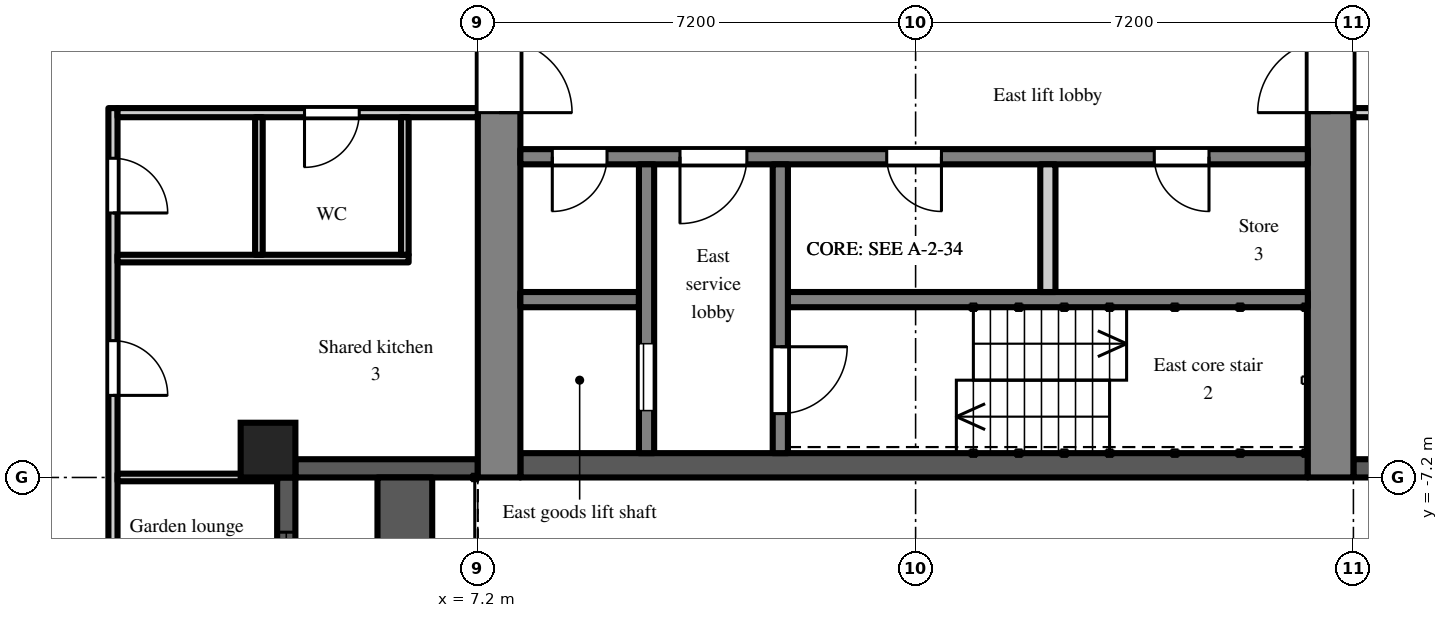
"""IFC4 building model, lengths in metres.
Left out: names, types, materials, properties, quantities, classifications, styles, units other than length and angle.
Written with IfcOpenShell. Run it as: python <this file> out.ifc"""

import sys

from ifc_helpers import new_model, si_unit, direction, frame, frame_2d, origin, origin_2d, place, context, subcontext, project, spatial, rectangle, extrude, element, fill, save


model = new_model("IFC4")
c1 = context("Model", 3, precision=1e-05, world=origin(), true_north=direction((0.0, 1.0)))
c2 = subcontext(c1, "Body", "Model", "MODEL_VIEW")
j1 = project(units=[si_unit("LENGTHUNIT", "METRE"), si_unit("PLANEANGLEUNIT", "RADIAN")], contexts=[c1])
p1 = place(None, origin())
s1 = spatial("IfcSite", under=j1, at=p1, CompositionType="ELEMENT")
p2 = place(p1, origin())
s2 = spatial("IfcBuilding", under=s1, at=p2, CompositionType="ELEMENT")
p3 = place(p2, frame((0.0, 0.0, 201.9)))
s3 = spatial("IfcBuildingStorey", under=s2, at=p3, CompositionType="ELEMENT", Elevation=201.9)
p4 = place(p3, frame((3.75, -6.75, 0.0), z_axis=(0.0, 0.0, 1.0), x_axis=(1.0, 0.0, 0.0)))
e1 = element("IfcColumn", 1, at=p4, inside=s3, PredefinedType="COLUMN", context=c2, shape_type="SweptSolid", body=[
    extrude(rectangle(XDim=0.9, YDim=0.9, at=origin_2d()), origin(), (0.0, 0.0, 1.0), 3.0),
])
p5 = place(p3, frame((21.6, -7.05, 0.0), z_axis=(0.0, 0.0, 1.0), x_axis=(1.0, 0.0, 0.0)))
e2 = element("IfcWall", 2, at=p5, inside=s3, PredefinedType="SOLIDWALL", context=c2, shape_type="SweptSolid", body=[
    extrude(rectangle(XDim=2.7, YDim=0.3, at=frame_2d((1.35, 0.0))), origin(), (0.0, 0.0, 1.0), 2.3),
])
p6 = place(p5, frame((0.75, 0.0, 0.2)))
e3 = element("IfcOpeningElement", 3, at=p6, cuts=e2, PredefinedType="OPENING", context=c2, shape_type="SweptSolid", body=[
    extrude(rectangle(XDim=1.2, YDim=1.85, at=frame_2d((0.6, 0.925))), frame((0.0, 0.16, 0.0), z_axis=(0.0, -1.0, 0.0), x_axis=(1.0, 0.0, 0.0)), (0.0, 0.0, 1.0), 0.32),
])
p7 = place(p3, frame((4.05, -14.4, 0.0), z_axis=(0.0, 0.0, 1.0), x_axis=(0.0, 1.0, 0.0)))
e4 = element("IfcWall", 4, at=p7, inside=s3, PredefinedType="SOLIDWALL", context=c2, shape_type="SweptSolid", body=[
    extrude(rectangle(XDim=7.2, YDim=0.3, at=frame_2d((3.6, 0.0))), origin(), (0.0, 0.0, 1.0), 2.3),
])
p8 = place(p7, frame((3.0, 0.0, 0.0)))
e5 = element("IfcOpeningElement", 5, at=p8, cuts=e4, PredefinedType="OPENING", context=c2, shape_type="SweptSolid", body=[
    extrude(rectangle(XDim=1.2, YDim=2.05, at=frame_2d((0.6, 1.025))), frame((0.0, 0.16, 0.0), z_axis=(0.0, -1.0, 0.0), x_axis=(1.0, 0.0, 0.0)), (0.0, 0.0, 1.0), 0.32),
])
p9 = place(p7, frame((0.9, 0.0, 0.2)))
e6 = element("IfcOpeningElement", 6, at=p9, cuts=e4, PredefinedType="OPENING", context=c2, shape_type="SweptSolid", body=[
    extrude(rectangle(XDim=1.8, YDim=1.85, at=frame_2d((0.9, 0.925))), frame((0.0, 0.16, 0.0), z_axis=(0.0, -1.0, 0.0), x_axis=(1.0, 0.0, 0.0)), (0.0, 0.0, 1.0), 0.32),
])
p10 = place(p7, frame((4.5, 0.0, 0.2)))
e7 = element("IfcOpeningElement", 7, at=p10, cuts=e4, PredefinedType="OPENING", context=c2, shape_type="SweptSolid", body=[
    extrude(rectangle(XDim=1.8, YDim=1.85, at=frame_2d((0.9, 0.925))), frame((0.0, 0.16, 0.0), z_axis=(0.0, -1.0, 0.0), x_axis=(1.0, 0.0, 0.0)), (0.0, 0.0, 1.0), 0.32),
])
p11 = place(p3, frame((4.2, -7.05, 0.0), z_axis=(0.0, 0.0, 1.0), x_axis=(1.0, 0.0, 0.0)))
e8 = element("IfcWall", 8, at=p11, inside=s3, PredefinedType="SOLIDWALL", context=c2, shape_type="SweptSolid", body=[
    extrude(rectangle(XDim=3.0, YDim=0.3, at=frame_2d((1.5, 0.0))), origin(), (0.0, 0.0, 1.0), 2.3),
])
p12 = place(p3, frame((6.0, -14.4, 0.0), z_axis=(0.0, 0.0, 1.0), x_axis=(0.0, 1.0, 0.0)))
e9 = element("IfcWall", 9, at=p12, inside=s3, PredefinedType="PARAPET", context=c2, shape_type="SweptSolid", body=[
    extrude(rectangle(XDim=7.2, YDim=0.9, at=frame_2d((3.6, 0.0))), origin(), (0.0, 0.0, 1.0), 0.8),
])
p13 = place(p3, frame((7.55, -7.2, 0.0), z_axis=(0.0, 0.0, 1.0), x_axis=(0.0, 1.0, 0.0)))
e10 = element("IfcWall", 10, at=p13, inside=s3, PredefinedType="SHEAR", context=c2, shape_type="SweptSolid", body=[
    extrude(rectangle(XDim=14.4, YDim=0.7, at=frame_2d((7.2, 0.0))), origin(), (0.0, 0.0, 1.0), 2.6),
])
p14 = place(p13, frame((6.0, 0.0, 0.0)))
e11 = element("IfcOpeningElement", 11, at=p14, cuts=e10, PredefinedType="OPENING", context=c2, shape_type="SweptSolid", body=[
    extrude(rectangle(XDim=2.4, YDim=2.2, at=frame_2d((1.2, 1.1))), frame((0.0, 0.36, 0.0), z_axis=(0.0, -1.0, 0.0), x_axis=(1.0, 0.0, 0.0)), (0.0, 0.0, 1.0), 0.72),
])
p15 = place(p3, frame((21.225, -7.2, 0.0), z_axis=(0.0, 0.0, 1.0), x_axis=(0.0, 1.0, 0.0)))
e12 = element("IfcWall", 12, at=p15, inside=s3, PredefinedType="SHEAR", context=c2, shape_type="SweptSolid", body=[
    extrude(rectangle(XDim=14.4, YDim=0.75, at=frame_2d((7.2, 0.0))), origin(), (0.0, 0.0, 1.0), 2.6),
])
p16 = place(p15, frame((6.0, 0.0, 0.0)))
e13 = element("IfcOpeningElement", 13, at=p16, cuts=e12, PredefinedType="OPENING", context=c2, shape_type="SweptSolid", body=[
    extrude(rectangle(XDim=2.4, YDim=2.2, at=frame_2d((1.2, 1.1))), frame((0.0, 0.385, 0.0), z_axis=(0.0, -1.0, 0.0), x_axis=(1.0, 0.0, 0.0)), (0.0, 0.0, 1.0), 0.77),
])
p17 = place(p3, frame((7.9, -7.0, 0.0), z_axis=(0.0, 0.0, 1.0), x_axis=(1.0, 0.0, 0.0)))
e14 = element("IfcWall", 14, at=p17, inside=s3, PredefinedType="SHEAR", context=c2, shape_type="SweptSolid", body=[
    extrude(rectangle(XDim=12.95, YDim=0.4, at=frame_2d((6.475, 0.0))), origin(), (0.0, 0.0, 1.0), 2.6),
])
p18 = place(p3, frame((7.9, -1.925, 0.0), z_axis=(0.0, 0.0, 1.0), x_axis=(1.0, 0.0, 0.0)))
e15 = element("IfcWall", 15, at=p18, inside=s3, PredefinedType="SHEAR", context=c2, shape_type="SweptSolid", body=[
    extrude(rectangle(XDim=12.95, YDim=0.25, at=frame_2d((6.475, 0.0))), origin(), (0.0, 0.0, 1.0), 2.6),
])
p19 = place(p18, frame((0.525, 0.0, 0.0)))
e16 = element("IfcOpeningElement", 16, at=p19, cuts=e15, PredefinedType="OPENING", context=c2, shape_type="SweptSolid", body=[
    extrude(rectangle(XDim=0.9, YDim=2.1, at=frame_2d((0.45, 1.05))), frame((0.0, 0.135, 0.0), z_axis=(0.0, -1.0, 0.0), x_axis=(1.0, 0.0, 0.0)), (0.0, 0.0, 1.0), 0.27),
])
p20 = place(p18, frame((2.625, 0.0, 0.0)))
e17 = element("IfcOpeningElement", 17, at=p20, cuts=e15, PredefinedType="OPENING", context=c2, shape_type="SweptSolid", body=[
    extrude(rectangle(XDim=1.1, YDim=2.1, at=frame_2d((0.55, 1.05))), frame((0.0, 0.135, 0.0), z_axis=(0.0, -1.0, 0.0), x_axis=(1.0, 0.0, 0.0)), (0.0, 0.0, 1.0), 0.27),
])
p21 = place(p18, frame((6.025, 0.0, 0.0)))
e18 = element("IfcOpeningElement", 18, at=p21, cuts=e15, PredefinedType="OPENING", context=c2, shape_type="SweptSolid", body=[
    extrude(rectangle(XDim=0.9, YDim=2.1, at=frame_2d((0.45, 1.05))), frame((0.0, 0.135, 0.0), z_axis=(0.0, -1.0, 0.0), x_axis=(1.0, 0.0, 0.0)), (0.0, 0.0, 1.0), 0.27),
])
p22 = place(p18, frame((10.425, 0.0, 0.0)))
e19 = element("IfcOpeningElement", 19, at=p22, cuts=e15, PredefinedType="OPENING", context=c2, shape_type="SweptSolid", body=[
    extrude(rectangle(XDim=0.9, YDim=2.1, at=frame_2d((0.45, 1.05))), frame((0.0, 0.135, 0.0), z_axis=(0.0, -1.0, 0.0), x_axis=(1.0, 0.0, 0.0)), (0.0, 0.0, 1.0), 0.27),
])
p23 = place(p3, frame((7.9, -4.275, 0.0), z_axis=(0.0, 0.0, 1.0), x_axis=(1.0, 0.0, 0.0)))
e20 = element("IfcWall", 20, at=p23, inside=s3, PredefinedType="SHEAR", context=c2, shape_type="SweptSolid", body=[
    extrude(rectangle(XDim=1.95, YDim=0.25, at=frame_2d((0.975, 0.0))), origin(), (0.0, 0.0, 1.0), 2.6),
])
p24 = place(p3, frame((12.3, -4.275, 0.0), z_axis=(0.0, 0.0, 1.0), x_axis=(1.0, 0.0, 0.0)))
e21 = element("IfcWall", 21, at=p24, inside=s3, PredefinedType="SHEAR", context=c2, shape_type="SweptSolid", body=[
    extrude(rectangle(XDim=8.55, YDim=0.25, at=frame_2d((4.275, 0.0))), origin(), (0.0, 0.0, 1.0), 2.6),
])
p25 = place(p3, frame((9.975, -2.05, 0.0), z_axis=(0.0, 0.0, 1.0), x_axis=(0.0, -1.0, 0.0)))
e22 = element("IfcWall", 22, at=p25, inside=s3, PredefinedType="SHEAR", context=c2, shape_type="SweptSolid", body=[
    extrude(rectangle(XDim=4.75, YDim=0.25, at=frame_2d((2.375, 0.0))), origin(), (0.0, 0.0, 1.0), 2.6),
])
p26 = place(p25, frame((2.95, 0.0, 0.0)))
e23 = element("IfcOpeningElement", 23, at=p26, cuts=e22, PredefinedType="OPENING", context=c2, shape_type="SweptSolid", body=[
    extrude(rectangle(XDim=1.1, YDim=2.1, at=frame_2d((0.55, 1.05))), frame((0.0, 0.135, 0.0), z_axis=(0.0, -1.0, 0.0), x_axis=(1.0, 0.0, 0.0)), (0.0, 0.0, 1.0), 0.27),
])
p27 = place(p3, frame((12.175, -2.05, 0.0), z_axis=(0.0, 0.0, 1.0), x_axis=(0.0, -1.0, 0.0)))
e24 = element("IfcWall", 24, at=p27, inside=s3, PredefinedType="SHEAR", context=c2, shape_type="SweptSolid", body=[
    extrude(rectangle(XDim=4.75, YDim=0.25, at=frame_2d((2.375, 0.0))), origin(), (0.0, 0.0, 1.0), 2.6),
])
p28 = place(p27, frame((3.0, 0.0, 0.0)))
e25 = element("IfcOpeningElement", 25, at=p28, cuts=e24, PredefinedType="OPENING", context=c2, shape_type="SweptSolid", body=[
    extrude(rectangle(XDim=1.1, YDim=2.1, at=frame_2d((0.55, 1.05))), frame((0.0, 0.135, 0.0), z_axis=(0.0, -1.0, 0.0), x_axis=(1.0, 0.0, 0.0)), (0.0, 0.0, 1.0), 0.27),
])
p29 = place(p3, frame((16.575, -2.05, 0.0), z_axis=(0.0, 0.0, 1.0), x_axis=(0.0, -1.0, 0.0)))
e26 = element("IfcWall", 26, at=p29, inside=s3, PredefinedType="PARTITIONING", context=c2, shape_type="SweptSolid", body=[
    extrude(rectangle(XDim=2.1, YDim=0.25, at=frame_2d((1.05, 0.0))), origin(), (0.0, 0.0, 1.0), 2.6),
])
p30 = place(p3, frame((1.2, -17.925, 0.0), z_axis=(0.0, 0.0, 1.0), x_axis=(0.0, 1.0, 0.0)))
e27 = element("IfcWall", 27, at=p30, inside=s3, PredefinedType="PARTITIONING", context=c2, shape_type="SweptSolid", body=[
    extrude(rectangle(XDim=16.8, YDim=0.15, at=frame_2d((8.4, 0.0))), origin(), (0.0, 0.0, 1.0), 2.6),
])
p31 = place(p30, frame((15.075, 0.0, 0.0)))
e28 = element("IfcOpeningElement", 28, at=p31, cuts=e27, PredefinedType="OPENING", context=c2, shape_type="SweptSolid", body=[
    extrude(rectangle(XDim=0.9, YDim=2.1, at=frame_2d((0.45, 1.05))), frame((0.0, 0.085, 0.0), z_axis=(0.0, -1.0, 0.0), x_axis=(1.0, 0.0, 0.0)), (0.0, 0.0, 1.0), 0.17),
])
p32 = place(p30, frame((12.075, 0.0, 0.0)))
e29 = element("IfcOpeningElement", 29, at=p32, cuts=e27, PredefinedType="OPENING", context=c2, shape_type="SweptSolid", body=[
    extrude(rectangle(XDim=0.9, YDim=2.1, at=frame_2d((0.45, 1.05))), frame((0.0, 0.085, 0.0), z_axis=(0.0, -1.0, 0.0), x_axis=(1.0, 0.0, 0.0)), (0.0, 0.0, 1.0), 0.17),
])
p33 = place(p30, frame((4.875, 0.0, 0.0)))
e30 = element("IfcOpeningElement", 30, at=p33, cuts=e27, PredefinedType="OPENING", context=c2, shape_type="SweptSolid", body=[
    extrude(rectangle(XDim=0.9, YDim=2.1, at=frame_2d((0.45, 1.05))), frame((0.0, 0.085, 0.0), z_axis=(0.0, -1.0, 0.0), x_axis=(1.0, 0.0, 0.0)), (0.0, 0.0, 1.0), 0.17),
])
p34 = place(p30, frame((1.925, 0.0, 0.0)))
e31 = element("IfcOpeningElement", 31, at=p34, cuts=e27, PredefinedType="OPENING", context=c2, shape_type="SweptSolid", body=[
    extrude(rectangle(XDim=1.0, YDim=2.1, at=frame_2d((0.5, 1.05))), frame((0.0, 0.085, 0.0), z_axis=(0.0, -1.0, 0.0), x_axis=(1.0, 0.0, 0.0)), (0.0, 0.0, 1.0), 0.17),
])
p35 = place(p3, frame((1.275, -7.2, 0.0), z_axis=(0.0, 0.0, 1.0), x_axis=(1.0, 0.0, 0.0)))
e32 = element("IfcWall", 32, at=p35, inside=s3, PredefinedType="PARTITIONING", context=c2, shape_type="SweptSolid", body=[
    extrude(rectangle(XDim=2.625, YDim=0.125, at=frame_2d((1.312, 0.0))), origin(), (0.0, 0.0, 1.0), 2.6),
])
p36 = place(p3, frame((1.275, -3.6, 0.0), z_axis=(0.0, 0.0, 1.0), x_axis=(1.0, 0.0, 0.0)))
e33 = element("IfcWall", 33, at=p36, inside=s3, PredefinedType="PARTITIONING", context=c2, shape_type="SweptSolid", body=[
    extrude(rectangle(XDim=4.788, YDim=0.125, at=frame_2d((2.394, 0.0))), origin(), (0.0, 0.0, 1.0), 2.6),
])
p37 = place(p3, frame((1.275, -1.2, 0.0), z_axis=(0.0, 0.0, 1.0), x_axis=(1.0, 0.0, 0.0)))
e34 = element("IfcWall", 34, at=p37, inside=s3, PredefinedType="PARTITIONING", context=c2, shape_type="SweptSolid", body=[
    extrude(rectangle(XDim=5.925, YDim=0.15, at=frame_2d((2.962, 0.0))), origin(), (0.0, 0.0, 1.0), 2.6),
])
p38 = place(p37, frame((3.075, 0.0, 0.0)))
e35 = element("IfcOpeningElement", 35, at=p38, cuts=e34, PredefinedType="OPENING", context=c2, shape_type="SweptSolid", body=[
    extrude(rectangle(XDim=0.9, YDim=2.1, at=frame_2d((0.45, 1.05))), frame((0.0, 0.085, 0.0), z_axis=(0.0, -1.0, 0.0), x_axis=(1.0, 0.0, 0.0)), (0.0, 0.0, 1.0), 0.17),
])
for number, where, z_axis, x_axis in (
    (36, (3.6, -3.538, 0.0), (0.0, 0.0, 1.0), (0.0, 1.0, 0.0)),
    (37, (6.0, -3.538, 0.0), (0.0, 0.0, 1.0), (0.0, 1.0, 0.0)),
):
    element("IfcWall", number, at=place(p3, frame(where, z_axis=z_axis, x_axis=x_axis)), inside=s3, PredefinedType="PARTITIONING", context=c2, shape_type="SweptSolid", body=[
        extrude(rectangle(XDim=2.263, YDim=0.125, at=frame_2d((1.131, 0.0))), origin(), (0.0, 0.0, 1.0), 2.6),
    ])
p39 = place(p3, frame((21.6, -1.2, 0.0), z_axis=(0.0, 0.0, 1.0), x_axis=(1.0, 0.0, 0.0)))
e38 = element("IfcWall", 38, at=p39, inside=s3, PredefinedType="PARTITIONING", context=c2, shape_type="SweptSolid", body=[
    extrude(rectangle(XDim=3.525, YDim=0.15, at=frame_2d((1.762, 0.0))), origin(), (0.0, 0.0, 1.0), 2.6),
])
p40 = place(p39, frame((0.9, 0.0, 0.0)))
e39 = element("IfcOpeningElement", 39, at=p40, cuts=e38, PredefinedType="OPENING", context=c2, shape_type="SweptSolid", body=[
    extrude(rectangle(XDim=1.8, YDim=2.1, at=frame_2d((0.9, 1.05))), frame((0.0, 0.085, 0.0), z_axis=(0.0, -1.0, 0.0), x_axis=(1.0, 0.0, 0.0)), (0.0, 0.0, 1.0), 0.17),
])
p41 = place(p10, origin())
e40 = element("IfcWindow", 40, at=p41, inside=s3, PartitioningType="SINGLE_PANEL", PredefinedType="WINDOW", context=c2, shape_type="SweptSolid", body=[
    extrude(rectangle(XDim=1.8, YDim=1.85, at=frame_2d((0.9, 0.925))), frame((0.0, 0.03, 0.0), z_axis=(0.0, -1.0, 0.0), x_axis=(1.0, 0.0, 0.0)), (0.0, 0.0, 1.0), 0.06),
])
fill(e7, e40)
p42 = place(p26, origin())
e41 = element("IfcDoor", 41, at=p42, inside=s3, OperationType="SLIDING_TO_LEFT", PredefinedType="DOOR", context=c2, shape_type="SweptSolid", body=[
    extrude(rectangle(XDim=1.1, YDim=2.1, at=frame_2d((0.55, 1.05))), frame((0.0, 0.025, 0.0), z_axis=(0.0, -1.0, 0.0), x_axis=(1.0, 0.0, 0.0)), (0.0, 0.0, 1.0), 0.05),
])
fill(e23, e41)
p43 = place(p28, origin())
e42 = element("IfcDoor", 42, at=p43, inside=s3, OperationType="SINGLE_SWING_LEFT", PredefinedType="DOOR", context=c2, shape_type="SweptSolid", body=[
    extrude(rectangle(XDim=1.1, YDim=2.1, at=frame_2d((0.55, 1.05))), frame((0.0, 0.025, 0.0), z_axis=(0.0, -1.0, 0.0), x_axis=(1.0, 0.0, 0.0)), (0.0, 0.0, 1.0), 0.05),
])
fill(e25, e42)
p44 = place(p19, frame((0.9, 0.0, 0.0), z_axis=(0.0, 0.0, 1.0), x_axis=(-1.0, 0.0, 0.0)))
e43 = element("IfcDoor", 43, at=p44, inside=s3, OperationType="SINGLE_SWING_RIGHT", PredefinedType="DOOR", context=c2, shape_type="SweptSolid", body=[
    extrude(rectangle(XDim=0.9, YDim=2.1, at=frame_2d((0.45, 1.05))), frame((0.0, 0.025, 0.0), z_axis=(0.0, -1.0, 0.0), x_axis=(1.0, 0.0, 0.0)), (0.0, 0.0, 1.0), 0.05),
])
fill(e16, e43)
p45 = place(p20, frame((1.1, 0.0, 0.0), z_axis=(0.0, 0.0, 1.0), x_axis=(-1.0, 0.0, 0.0)))
e44 = element("IfcDoor", 44, at=p45, inside=s3, OperationType="SINGLE_SWING_RIGHT", PredefinedType="DOOR", context=c2, shape_type="SweptSolid", body=[
    extrude(rectangle(XDim=1.1, YDim=2.1, at=frame_2d((0.55, 1.05))), frame((0.0, 0.025, 0.0), z_axis=(0.0, -1.0, 0.0), x_axis=(1.0, 0.0, 0.0)), (0.0, 0.0, 1.0), 0.05),
])
fill(e17, e44)
p46 = place(p14, frame((2.4, 0.0, 0.0), z_axis=(0.0, 0.0, 1.0), x_axis=(-1.0, 0.0, 0.0)))
e45 = element("IfcDoor", 45, at=p46, inside=s3, OperationType="DOUBLE_DOOR_DOUBLE_SWING", PredefinedType="DOOR", context=c2, shape_type="SweptSolid", body=[
    extrude(rectangle(XDim=2.4, YDim=2.2, at=frame_2d((1.2, 1.1))), frame((0.0, 0.025, 0.0), z_axis=(0.0, -1.0, 0.0), x_axis=(1.0, 0.0, 0.0)), (0.0, 0.0, 1.0), 0.05),
])
fill(e11, e45)
p47 = place(p16, origin())
e46 = element("IfcDoor", 46, at=p47, inside=s3, OperationType="DOUBLE_DOOR_DOUBLE_SWING", PredefinedType="DOOR", context=c2, shape_type="SweptSolid", body=[
    extrude(rectangle(XDim=2.4, YDim=2.2, at=frame_2d((1.2, 1.1))), frame((0.0, 0.025, 0.0), z_axis=(0.0, -1.0, 0.0), x_axis=(1.0, 0.0, 0.0)), (0.0, 0.0, 1.0), 0.05),
])
fill(e13, e46)
p48 = place(p21, frame((0.9, 0.0, 0.0), z_axis=(0.0, 0.0, 1.0), x_axis=(-1.0, 0.0, 0.0)))
e47 = element("IfcDoor", 47, at=p48, inside=s3, OperationType="SINGLE_SWING_LEFT", PredefinedType="DOOR", context=c2, shape_type="SweptSolid", body=[
    extrude(rectangle(XDim=0.9, YDim=2.1, at=frame_2d((0.45, 1.05))), frame((0.0, 0.025, 0.0), z_axis=(0.0, -1.0, 0.0), x_axis=(1.0, 0.0, 0.0)), (0.0, 0.0, 1.0), 0.05),
])
fill(e18, e47)
p49 = place(p22, frame((0.9, 0.0, 0.0), z_axis=(0.0, 0.0, 1.0), x_axis=(-1.0, 0.0, 0.0)))
e48 = element("IfcDoor", 48, at=p49, inside=s3, OperationType="SINGLE_SWING_LEFT", PredefinedType="DOOR", context=c2, shape_type="SweptSolid", body=[
    extrude(rectangle(XDim=0.9, YDim=2.1, at=frame_2d((0.45, 1.05))), frame((0.0, 0.025, 0.0), z_axis=(0.0, -1.0, 0.0), x_axis=(1.0, 0.0, 0.0)), (0.0, 0.0, 1.0), 0.05),
])
fill(e19, e48)
p50 = place(p31, frame((0.9, 0.0, 0.0), z_axis=(0.0, 0.0, 1.0), x_axis=(-1.0, 0.0, 0.0)))
e49 = element("IfcDoor", 49, at=p50, inside=s3, OperationType="SINGLE_SWING_RIGHT", PredefinedType="DOOR", context=c2, shape_type="SweptSolid", body=[
    extrude(rectangle(XDim=0.9, YDim=2.1, at=frame_2d((0.45, 1.05))), frame((0.0, 0.025, 0.0), z_axis=(0.0, -1.0, 0.0), x_axis=(1.0, 0.0, 0.0)), (0.0, 0.0, 1.0), 0.05),
])
fill(e28, e49)
p51 = place(p38, frame((0.9, 0.0, 0.0), z_axis=(0.0, 0.0, 1.0), x_axis=(-1.0, 0.0, 0.0)))
e50 = element("IfcDoor", 50, at=p51, inside=s3, OperationType="SINGLE_SWING_RIGHT", PredefinedType="DOOR", context=c2, shape_type="SweptSolid", body=[
    extrude(rectangle(XDim=0.9, YDim=2.1, at=frame_2d((0.45, 1.05))), frame((0.0, 0.025, 0.0), z_axis=(0.0, -1.0, 0.0), x_axis=(1.0, 0.0, 0.0)), (0.0, 0.0, 1.0), 0.05),
])
fill(e35, e50)
p52 = place(p32, frame((0.9, 0.0, 0.0), z_axis=(0.0, 0.0, 1.0), x_axis=(-1.0, 0.0, 0.0)))
e51 = element("IfcDoor", 51, at=p52, inside=s3, OperationType="SINGLE_SWING_RIGHT", PredefinedType="DOOR", context=c2, shape_type="SweptSolid", body=[
    extrude(rectangle(XDim=0.9, YDim=2.1, at=frame_2d((0.45, 1.05))), frame((0.0, 0.025, 0.0), z_axis=(0.0, -1.0, 0.0), x_axis=(1.0, 0.0, 0.0)), (0.0, 0.0, 1.0), 0.05),
])
fill(e29, e51)
save(model, sys.argv[1])
